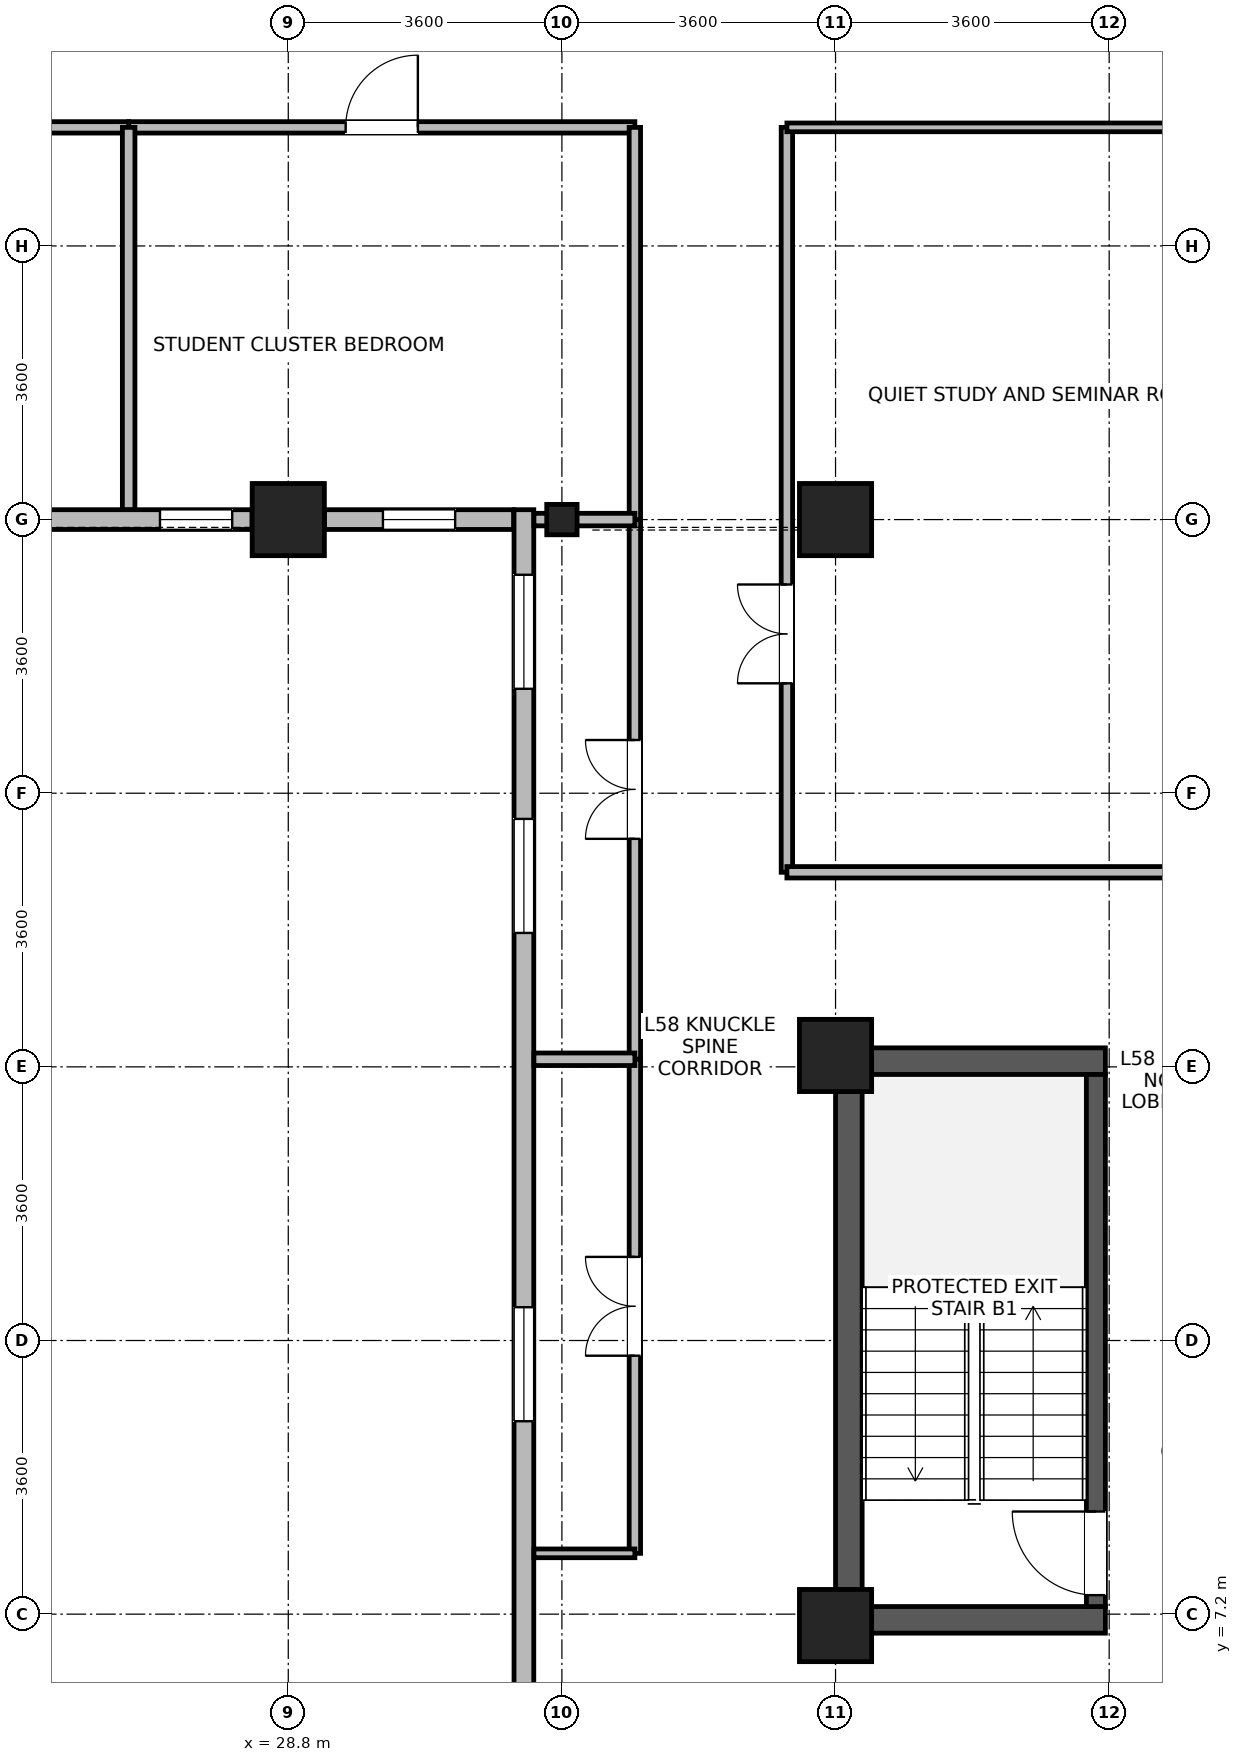
"""IFC4 building model, lengths in metres.
Left out: names, types, materials, properties, quantities, classifications, styles, units other than length and angle.
Written with IfcOpenShell. Run it as: python <this file> out.ifc"""

import sys

from ifc_helpers import new_model, si_unit, direction, frame, frame_2d, origin, origin_2d, place, context, subcontext, project, spatial, rectangle, i_section, extrude, source, transform, mapped, element, fill, save


model = new_model("IFC4")
c1 = context("Model", 3, precision=1e-05, world=origin(), true_north=direction((0.0, 1.0)))
c2 = subcontext(c1, "Body", "Model", "MODEL_VIEW")
j1 = project(units=[si_unit("LENGTHUNIT", "METRE"), si_unit("PLANEANGLEUNIT", "RADIAN")], contexts=[c1])
p1 = place(None, origin())
s1 = spatial("IfcSite", under=j1, at=p1, CompositionType="ELEMENT")
p2 = place(p1, origin())
s2 = spatial("IfcBuilding", under=s1, at=p2, CompositionType="ELEMENT")
p3 = place(p2, frame((0.0, 0.0, 227.7)))
s3 = spatial("IfcBuildingStorey", under=s2, at=p3, CompositionType="ELEMENT", Elevation=227.7)
p4 = place(p3, frame((36.175, 6.95, 0.0), z_axis=(0.0, 0.0, 1.0), x_axis=(0.0, 1.0, 0.0)))
e1 = element("IfcWall", 1, at=p4, inside=s3, PredefinedType="SHEAR", context=c2, shape_type="SweptSolid", body=[
    extrude(rectangle(XDim=7.7, YDim=0.35, at=frame_2d((3.85, 0.0))), origin(), (0.0, 0.0, 1.0), 3.47),
])
for number, where, z_axis, x_axis in (
    (2, (36.35, 7.125, 0.0), (0.0, 0.0, 1.0), (1.0, 0.0, 0.0)),
    (3, (36.35, 14.475, 0.0), (0.0, 0.0, 1.0), (1.0, 0.0, 0.0)),
):
    element("IfcWall", number, at=place(p3, frame(where, z_axis=z_axis, x_axis=x_axis)), inside=s3, PredefinedType="SHEAR", context=c2, shape_type="SweptSolid", body=[
        extrude(rectangle(XDim=3.2, YDim=0.35, at=frame_2d((1.6, 0.0))), origin(), (0.0, 0.0, 1.0), 3.47),
    ])
p5 = place(p3, frame((39.425, 7.3, 0.0), z_axis=(0.0, 0.0, 1.0), x_axis=(0.0, 1.0, 0.0)))
e4 = element("IfcWall", 4, at=p5, inside=s3, PredefinedType="SHEAR", context=c2, shape_type="SweptSolid", body=[
    extrude(rectangle(XDim=7.0, YDim=0.25, at=frame_2d((3.5, 0.0))), origin(), (0.0, 0.0, 1.0), 3.47),
])
p6 = place(p5, frame((0.15, 0.0, 0.0)))
e5 = element("IfcOpeningElement", 5, at=p6, cuts=e4, PredefinedType="OPENING", context=c2, shape_type="SweptSolid", body=[
    extrude(rectangle(XDim=1.1, YDim=2.08, at=frame_2d((0.55, 1.04))), frame((0.0, 0.135, 0.0), z_axis=(0.0, -1.0, 0.0), x_axis=(1.0, 0.0, 0.0)), (0.0, 0.0, 1.0), 0.27),
])
m1 = source(origin(), c2, "Body", "SweptSolid", [
    extrude(rectangle(XDim=0.95, YDim=0.95, at=origin_2d()), origin(), (0.0, 0.0, 1.0), 3.7),
])
for number, where, z_axis, x_axis in (
    (6, (28.8, 21.6, 0.0), (0.0, 0.0, 1.0), (1.0, 0.0, 0.0)),
    (7, (36.0, 21.6, 0.0), (0.0, 0.0, 1.0), (1.0, 0.0, 0.0)),
    (8, (36.0, 7.05, 0.0), (0.0, 0.0, 1.0), (1.0, 0.0, 0.0)),
    (9, (36.0, 14.55, 0.0), (0.0, 0.0, 1.0), (1.0, 0.0, 0.0)),
):
    element("IfcColumn", number, at=place(p3, frame(where, z_axis=z_axis, x_axis=x_axis)), inside=s3, PredefinedType="COLUMN", context=c2, shape_type="MappedRepresentation", body=[
        mapped(m1, transform((0.0, 0.0, 0.0), x_axis=(1.0, 0.0, 0.0), y_axis=(0.0, 1.0, 0.0), z_axis=(0.0, 0.0, 1.0), scale=1.0)),
    ])
m2 = source(origin(), c2, "Body", "SweptSolid", [
    extrude(i_section(OverallWidth=0.399, OverallDepth=0.4, WebThickness=0.017, FlangeThickness=0.023, FilletRadius=0.015, at=origin_2d()), origin(), (0.0, 0.0, 1.0), 3.7),
])
p7 = place(p3, frame((32.4, 21.6, 0.0), z_axis=(0.0, 0.0, 1.0), x_axis=(1.0, 0.0, 0.0)))
e10 = element("IfcColumn", 10, at=p7, inside=s3, PredefinedType="COLUMN", context=c2, shape_type="MappedRepresentation", body=[
    mapped(m2, transform((0.0, 0.0, 0.0), x_axis=(1.0, 0.0, 0.0), y_axis=(0.0, 1.0, 0.0), z_axis=(0.0, 0.0, 1.0), scale=1.0)),
])
p8 = place(p3, frame((28.324, 21.6, 0.0), z_axis=(0.0, 0.0, 1.0), x_axis=(-1.0, 0.0, 0.0)))
e11 = element("IfcWall", 11, at=p8, inside=s3, PredefinedType="STANDARD", context=c2, shape_type="SweptSolid", body=[
    extrude(rectangle(XDim=2.924, YDim=0.26, at=frame_2d((1.462, 0.0))), origin(), (0.0, 0.0, 1.0), 3.05),
])
p9 = place(p8, frame((0.262, 0.0, 0.85)))
e12 = element("IfcOpeningElement", 12, at=p9, cuts=e11, PredefinedType="OPENING", context=c2, shape_type="SweptSolid", body=[
    extrude(rectangle(XDim=0.95, YDim=1.75, at=frame_2d((0.475, 0.875))), frame((0.0, 0.14, 0.0), z_axis=(0.0, -1.0, 0.0), x_axis=(1.0, 0.0, 0.0)), (0.0, 0.0, 1.0), 0.28),
])
p10 = place(p3, frame((31.765, 21.6, 0.0), z_axis=(0.0, 0.0, 1.0), x_axis=(-1.0, 0.0, 0.0)))
e13 = element("IfcWall", 13, at=p10, inside=s3, PredefinedType="STANDARD", context=c2, shape_type="SweptSolid", body=[
    extrude(rectangle(XDim=2.489, YDim=0.26, at=frame_2d((1.245, 0.0))), origin(), (0.0, 0.0, 1.0), 3.05),
])
p11 = place(p10, frame((0.77, 0.0, 0.85)))
e14 = element("IfcOpeningElement", 14, at=p11, cuts=e13, PredefinedType="OPENING", context=c2, shape_type="SweptSolid", body=[
    extrude(rectangle(XDim=0.95, YDim=1.75, at=frame_2d((0.475, 0.875))), frame((0.0, 0.14, 0.0), z_axis=(0.0, -1.0, 0.0), x_axis=(1.0, 0.0, 0.0)), (0.0, 0.0, 1.0), 0.28),
])
p12 = place(p3, frame((31.9, 5.67, 0.0), z_axis=(0.0, 0.0, 1.0), x_axis=(0.0, 1.0, 0.0)))
e15 = element("IfcWall", 15, at=p12, inside=s3, PredefinedType="STANDARD", context=c2, shape_type="SweptSolid", body=[
    extrude(rectangle(XDim=16.06, YDim=0.26, at=frame_2d((8.03, 0.0))), origin(), (0.0, 0.0, 1.0), 3.45),
])
p13 = place(p12, frame((4.068, 0.0, 0.85)))
e16 = element("IfcOpeningElement", 16, at=p13, cuts=e15, PredefinedType="OPENING", context=c2, shape_type="SweptSolid", body=[
    extrude(rectangle(XDim=1.5, YDim=1.85, at=frame_2d((0.75, 0.925))), frame((0.0, 0.14, 0.0), z_axis=(0.0, -1.0, 0.0), x_axis=(1.0, 0.0, 0.0)), (0.0, 0.0, 1.0), 0.28),
])
p14 = place(p12, frame((10.492, 0.0, 0.85)))
e17 = element("IfcOpeningElement", 17, at=p14, cuts=e15, PredefinedType="OPENING", context=c2, shape_type="SweptSolid", body=[
    extrude(rectangle(XDim=1.5, YDim=1.85, at=frame_2d((0.75, 0.925))), frame((0.0, 0.14, 0.0), z_axis=(0.0, -1.0, 0.0), x_axis=(1.0, 0.0, 0.0)), (0.0, 0.0, 1.0), 0.28),
])
p15 = place(p12, frame((13.704, 0.0, 0.85)))
e18 = element("IfcOpeningElement", 18, at=p15, cuts=e15, PredefinedType="OPENING", context=c2, shape_type="SweptSolid", body=[
    extrude(rectangle(XDim=1.5, YDim=1.85, at=frame_2d((0.75, 0.925))), frame((0.0, 0.14, 0.0), z_axis=(0.0, -1.0, 0.0), x_axis=(1.0, 0.0, 0.0)), (0.0, 0.0, 1.0), 0.28),
])
p16 = place(p3, frame((35.36, 16.96, 0.0), z_axis=(0.0, 0.0, 1.0), x_axis=(0.0, 1.0, 0.0)))
e19 = element("IfcWall", 19, at=p16, inside=s3, PredefinedType="PARTITIONING", context=c2, shape_type="SweptSolid", body=[
    extrude(rectangle(XDim=9.8, YDim=0.15, at=frame_2d((4.9, 0.0))), origin(), (0.0, 0.0, 1.0), 3.45),
])
p17 = place(p16, frame((2.486, 0.0, 0.0)))
e20 = element("IfcOpeningElement", 20, at=p17, cuts=e19, PredefinedType="OPENING", context=c2, shape_type="SweptSolid", body=[
    extrude(rectangle(XDim=1.3, YDim=2.12, at=frame_2d((0.65, 1.06))), frame((0.0, 0.085, 0.0), z_axis=(0.0, -1.0, 0.0), x_axis=(1.0, 0.0, 0.0)), (0.0, 0.0, 1.0), 0.17),
])
p18 = place(p3, frame((33.36, 14.5, 0.0), z_axis=(0.0, 0.0, 1.0), x_axis=(0.0, 1.0, 0.0)))
e21 = element("IfcWall", 21, at=p18, inside=s3, PredefinedType="PARTITIONING", context=c2, shape_type="SweptSolid", body=[
    extrude(rectangle(XDim=7.1, YDim=0.15, at=frame_2d((3.55, 0.0))), origin(), (0.0, 0.0, 1.0), 3.45),
])
p19 = place(p18, frame((2.9, 0.0, 0.0)))
e22 = element("IfcOpeningElement", 22, at=p19, cuts=e21, PredefinedType="OPENING", context=c2, shape_type="SweptSolid", body=[
    extrude(rectangle(XDim=1.3, YDim=2.12, at=frame_2d((0.65, 1.06))), frame((0.0, 0.085, 0.0), z_axis=(0.0, -1.0, 0.0), x_axis=(1.0, 0.0, 0.0)), (0.0, 0.0, 1.0), 0.17),
])
p20 = place(p3, frame((35.36, 16.96, 0.0), z_axis=(0.0, 0.0, 1.0), x_axis=(1.0, 0.0, 0.0)))
e23 = element("IfcWall", 23, at=p20, inside=s3, PredefinedType="PARTITIONING", context=c2, shape_type="SweptSolid", body=[
    extrude(rectangle(XDim=6.66, YDim=0.15, at=frame_2d((3.33, 0.0))), origin(), (0.0, 0.0, 1.0), 3.45),
])
p21 = place(p3, frame((26.7, 26.76, 0.0), z_axis=(0.0, 0.0, 1.0), x_axis=(1.0, 0.0, 0.0)))
e24 = element("IfcWall", 24, at=p21, inside=s3, PredefinedType="PARTITIONING", context=c2, shape_type="SweptSolid", body=[
    extrude(rectangle(XDim=6.66, YDim=0.15, at=frame_2d((3.33, 0.0))), origin(), (0.0, 0.0, 1.0), 3.45),
])
p22 = place(p21, frame((2.855, 0.0, 0.0)))
e25 = element("IfcOpeningElement", 25, at=p22, cuts=e24, PredefinedType="OPENING", context=c2, shape_type="SweptSolid", body=[
    extrude(rectangle(XDim=0.95, YDim=2.1, at=frame_2d((0.475, 1.05))), frame((0.0, 0.085, 0.0), z_axis=(0.0, -1.0, 0.0), x_axis=(1.0, 0.0, 0.0)), (0.0, 0.0, 1.0), 0.17),
])
p23 = place(p3, frame((33.36, 8.0, 0.0), z_axis=(0.0, 0.0, 1.0), x_axis=(0.0, 1.0, 0.0)))
e26 = element("IfcWall", 26, at=p23, inside=s3, PredefinedType="PARTITIONING", context=c2, shape_type="SweptSolid", body=[
    extrude(rectangle(XDim=6.5, YDim=0.15, at=frame_2d((3.25, 0.0))), origin(), (0.0, 0.0, 1.0), 3.45),
])
p24 = place(p23, frame((2.6, 0.0, 0.0)))
e27 = element("IfcOpeningElement", 27, at=p24, cuts=e26, PredefinedType="OPENING", context=c2, shape_type="SweptSolid", body=[
    extrude(rectangle(XDim=1.3, YDim=2.12, at=frame_2d((0.65, 1.06))), frame((0.0, 0.085, 0.0), z_axis=(0.0, -1.0, 0.0), x_axis=(1.0, 0.0, 0.0)), (0.0, 0.0, 1.0), 0.17),
])
p25 = place(p3, frame((20.46, 26.76, 0.0), z_axis=(0.0, 0.0, 1.0), x_axis=(1.0, 0.0, 0.0)))
e28 = element("IfcWall", 28, at=p25, inside=s3, PredefinedType="PARTITIONING", context=c2, shape_type="SweptSolid", body=[
    extrude(rectangle(XDim=6.24, YDim=0.15, at=frame_2d((3.12, 0.0))), origin(), (0.0, 0.0, 1.0), 3.45),
])
p26 = place(p25, frame((2.645, 0.0, 0.0)))
e29 = element("IfcOpeningElement", 29, at=p26, cuts=e28, PredefinedType="OPENING", context=c2, shape_type="SweptSolid", body=[
    extrude(rectangle(XDim=0.95, YDim=2.1, at=frame_2d((0.475, 1.05))), frame((0.0, 0.085, 0.0), z_axis=(0.0, -1.0, 0.0), x_axis=(1.0, 0.0, 0.0)), (0.0, 0.0, 1.0), 0.17),
])
p27 = place(p3, frame((33.36, 21.6, 0.0), z_axis=(0.0, 0.0, 1.0), x_axis=(0.0, 1.0, 0.0)))
e30 = element("IfcWall", 30, at=p27, inside=s3, PredefinedType="PARTITIONING", context=c2, shape_type="SweptSolid", body=[
    extrude(rectangle(XDim=5.16, YDim=0.15, at=frame_2d((2.58, 0.0))), origin(), (0.0, 0.0, 1.0), 3.45),
])
p28 = place(p3, frame((35.36, 26.76, 0.0), z_axis=(0.0, 0.0, 1.0), x_axis=(1.0, 0.0, 0.0)))
e31 = element("IfcWall", 31, at=p28, inside=s3, PredefinedType="PARTITIONING", context=c2, shape_type="SweptSolid", body=[
    extrude(rectangle(XDim=6.66, YDim=0.115, at=frame_2d((3.33, 0.0))), origin(), (0.0, 0.0, 1.0), 3.45),
])
p29 = place(p3, frame((26.7, 21.732, 0.0), z_axis=(0.0, 0.0, 1.0), x_axis=(0.0, 1.0, 0.0)))
e32 = element("IfcWall", 32, at=p29, inside=s3, PredefinedType="PARTITIONING", context=c2, shape_type="SweptSolid", body=[
    extrude(rectangle(XDim=5.028, YDim=0.165, at=frame_2d((2.514, 0.0))), origin(), (0.0, 0.0, 1.0), 3.45),
])
p30 = place(p3, frame((32.032, 8.0, 0.0), z_axis=(0.0, 0.0, 1.0), x_axis=(1.0, 0.0, 0.0)))
e33 = element("IfcWall", 33, at=p30, inside=s3, PredefinedType="PARTITIONING", context=c2, shape_type="SweptSolid", body=[
    extrude(rectangle(XDim=1.328, YDim=0.115, at=frame_2d((0.664, 0.0))), origin(), (0.0, 0.0, 1.0), 3.45),
])
p31 = place(p3, frame((32.032, 14.5, 0.0), z_axis=(0.0, 0.0, 1.0), x_axis=(1.0, 0.0, 0.0)))
e34 = element("IfcWall", 34, at=p31, inside=s3, PredefinedType="PARTITIONING", context=c2, shape_type="SweptSolid", body=[
    extrude(rectangle(XDim=1.328, YDim=0.165, at=frame_2d((0.664, 0.0))), origin(), (0.0, 0.0, 1.0), 3.45),
])
p32 = place(p3, frame((32.032, 21.6, 0.0), z_axis=(0.0, 0.0, 1.0), x_axis=(1.0, 0.0, 0.0)))
e35 = element("IfcWall", 35, at=p32, inside=s3, PredefinedType="PARTITIONING", context=c2, shape_type="SweptSolid", body=[
    extrude(rectangle(XDim=1.328, YDim=0.165, at=frame_2d((0.664, 0.0))), origin(), (0.0, 0.0, 1.0), 3.05),
])
p33 = place(p9, origin())
e36 = element("IfcWindow", 36, at=p33, inside=s3, PartitioningType="SINGLE_PANEL", PredefinedType="WINDOW", context=c2, shape_type="SweptSolid", body=[
    extrude(rectangle(XDim=0.95, YDim=1.75, at=frame_2d((0.475, 0.875))), frame((0.0, 0.03, 0.0), z_axis=(0.0, -1.0, 0.0), x_axis=(1.0, 0.0, 0.0)), (0.0, 0.0, 1.0), 0.06),
])
fill(e12, e36)
p34 = place(p11, origin())
e37 = element("IfcWindow", 37, at=p34, inside=s3, PartitioningType="SINGLE_PANEL", PredefinedType="WINDOW", context=c2, shape_type="SweptSolid", body=[
    extrude(rectangle(XDim=0.95, YDim=1.75, at=frame_2d((0.475, 0.875))), frame((0.0, 0.03, 0.0), z_axis=(0.0, -1.0, 0.0), x_axis=(1.0, 0.0, 0.0)), (0.0, 0.0, 1.0), 0.06),
])
fill(e14, e37)
p35 = place(p13, origin())
e38 = element("IfcWindow", 38, at=p35, inside=s3, PartitioningType="SINGLE_PANEL", PredefinedType="WINDOW", context=c2, shape_type="SweptSolid", body=[
    extrude(rectangle(XDim=1.5, YDim=1.85, at=frame_2d((0.75, 0.925))), frame((0.0, 0.03, 0.0), z_axis=(0.0, -1.0, 0.0), x_axis=(1.0, 0.0, 0.0)), (0.0, 0.0, 1.0), 0.06),
])
fill(e16, e38)
p36 = place(p14, origin())
e39 = element("IfcWindow", 39, at=p36, inside=s3, PartitioningType="SINGLE_PANEL", PredefinedType="WINDOW", context=c2, shape_type="SweptSolid", body=[
    extrude(rectangle(XDim=1.5, YDim=1.85, at=frame_2d((0.75, 0.925))), frame((0.0, 0.03, 0.0), z_axis=(0.0, -1.0, 0.0), x_axis=(1.0, 0.0, 0.0)), (0.0, 0.0, 1.0), 0.06),
])
fill(e17, e39)
p37 = place(p15, origin())
e40 = element("IfcWindow", 40, at=p37, inside=s3, PartitioningType="SINGLE_PANEL", PredefinedType="WINDOW", context=c2, shape_type="SweptSolid", body=[
    extrude(rectangle(XDim=1.5, YDim=1.85, at=frame_2d((0.75, 0.925))), frame((0.0, 0.03, 0.0), z_axis=(0.0, -1.0, 0.0), x_axis=(1.0, 0.0, 0.0)), (0.0, 0.0, 1.0), 0.06),
])
fill(e18, e40)
p38 = place(p6, origin())
e41 = element("IfcDoor", 41, at=p38, inside=s3, OperationType="SINGLE_SWING_RIGHT", PredefinedType="DOOR", context=c2, shape_type="SweptSolid", body=[
    extrude(rectangle(XDim=1.1, YDim=2.08, at=frame_2d((0.55, 1.04))), frame((0.0, 0.025, 0.0), z_axis=(0.0, -1.0, 0.0), x_axis=(1.0, 0.0, 0.0)), (0.0, 0.0, 1.0), 0.05),
])
fill(e5, e41)
p39 = place(p17, origin())
e42 = element("IfcDoor", 42, at=p39, inside=s3, OperationType="DOUBLE_DOOR_SINGLE_SWING", PredefinedType="DOOR", context=c2, shape_type="SweptSolid", body=[
    extrude(rectangle(XDim=1.3, YDim=2.12, at=frame_2d((0.65, 1.06))), frame((0.0, 0.025, 0.0), z_axis=(0.0, -1.0, 0.0), x_axis=(1.0, 0.0, 0.0)), (0.0, 0.0, 1.0), 0.05),
])
fill(e20, e42)
p40 = place(p19, origin())
e43 = element("IfcDoor", 43, at=p40, inside=s3, OperationType="DOUBLE_DOOR_SINGLE_SWING", PredefinedType="DOOR", context=c2, shape_type="SweptSolid", body=[
    extrude(rectangle(XDim=1.3, YDim=2.12, at=frame_2d((0.65, 1.06))), frame((0.0, 0.025, 0.0), z_axis=(0.0, -1.0, 0.0), x_axis=(1.0, 0.0, 0.0)), (0.0, 0.0, 1.0), 0.05),
])
fill(e22, e43)
p41 = place(p22, origin())
e44 = element("IfcDoor", 44, at=p41, inside=s3, OperationType="SINGLE_SWING_RIGHT", PredefinedType="DOOR", context=c2, shape_type="SweptSolid", body=[
    extrude(rectangle(XDim=0.95, YDim=2.1, at=frame_2d((0.475, 1.05))), frame((0.0, 0.025, 0.0), z_axis=(0.0, -1.0, 0.0), x_axis=(1.0, 0.0, 0.0)), (0.0, 0.0, 1.0), 0.05),
])
fill(e25, e44)
p42 = place(p24, origin())
e45 = element("IfcDoor", 45, at=p42, inside=s3, OperationType="DOUBLE_DOOR_SINGLE_SWING", PredefinedType="DOOR", context=c2, shape_type="SweptSolid", body=[
    extrude(rectangle(XDim=1.3, YDim=2.12, at=frame_2d((0.65, 1.06))), frame((0.0, 0.025, 0.0), z_axis=(0.0, -1.0, 0.0), x_axis=(1.0, 0.0, 0.0)), (0.0, 0.0, 1.0), 0.05),
])
fill(e27, e45)
save(model, sys.argv[1])
